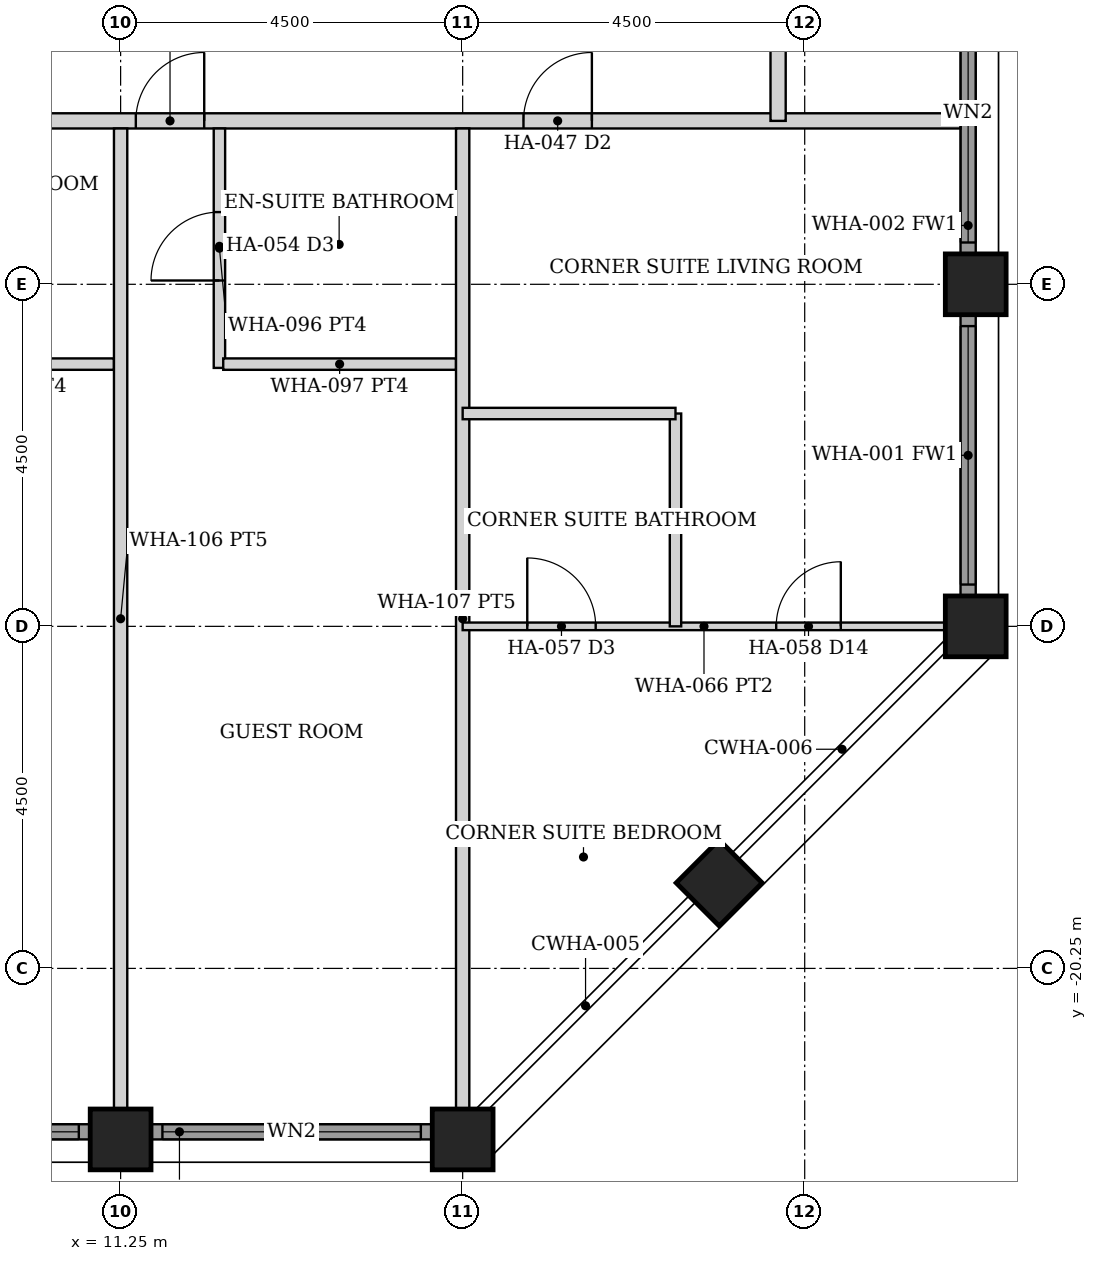
"""IFC4 building model, lengths in metres.
Left out: names, types, materials, properties, quantities, classifications, styles, units other than length and angle.
Written with IfcOpenShell. Run it as: python <this file> out.ifc"""

import sys

from ifc_helpers import new_model, si_unit, direction, frame, frame_2d, origin, origin_2d, place, context, subcontext, project, spatial, rectangle, hollow_rectangle, extrude, element, fill, save


model = new_model("IFC4")
c1 = context("Model", 3, precision=1e-05, world=origin(), true_north=direction((0.0, 1.0)))
c2 = subcontext(c1, "Body", "Model", "MODEL_VIEW")
j1 = project(units=[si_unit("LENGTHUNIT", "METRE"), si_unit("PLANEANGLEUNIT", "RADIAN")], contexts=[c1])
p1 = place(None, origin())
s1 = spatial("IfcSite", under=j1, at=p1, CompositionType="ELEMENT")
p2 = place(p1, origin())
s2 = spatial("IfcBuilding", under=s1, at=p2, CompositionType="ELEMENT")
p3 = place(p2, frame((0.0, 0.0, 118.4)))
s3 = spatial("IfcBuildingStorey", under=s2, at=p3, CompositionType="ELEMENT", Elevation=118.4)
for number, where, z_axis, x_axis in (
    (1, (22.5, -15.75, 0.0), (0.0, 0.0, 1.0), (1.0, 0.0, 0.0)),
    (2, (22.5, -11.25, 0.0), (0.0, 0.0, 1.0), (1.0, 0.0, 0.0)),
    (3, (11.25, -22.5, 0.0), (0.0, 0.0, 1.0), (0.0, 1.0, 0.0)),
    (4, (15.75, -22.5, 0.0), (0.0, 0.0, 1.0), (0.0, 1.0, 0.0)),
    (5, (19.125, -19.125, 0.0), (0.0, 0.0, 1.0), (0.707, -0.707, 0.0)),
):
    element("IfcColumn", number, at=place(p3, frame(where, z_axis=z_axis, x_axis=x_axis)), inside=s3, PredefinedType="COLUMN", context=c2, shape_type="SweptSolid", body=[
        extrude(hollow_rectangle(XDim=0.8, YDim=0.8, WallThickness=0.06, at=origin_2d()), origin(), (0.0, 0.0, 1.0), 3.6),
    ])
p4 = place(p3, frame((7.155, -22.4, 0.0), z_axis=(0.0, 0.0, 1.0), x_axis=(1.0, 0.0, 0.0)))
e6 = element("IfcWall", 6, at=p4, inside=s3, PredefinedType="SOLIDWALL", context=c2, shape_type="SweptSolid", body=[
    extrude(rectangle(XDim=3.69, YDim=0.2, at=frame_2d((1.845, 0.0))), origin(), (0.0, 0.0, 1.0), 2.479),
])
p5 = place(p4, frame((0.145, 0.0, 0.3)))
e7 = element("IfcOpeningElement", 7, at=p5, cuts=e6, PredefinedType="OPENING", context=c2, shape_type="SweptSolid", body=[
    extrude(rectangle(XDim=3.4, YDim=2.029, at=frame_2d((1.7, 1.015))), frame((0.0, 0.11, 0.0), z_axis=(0.0, -1.0, 0.0), x_axis=(1.0, 0.0, 0.0)), (0.0, 0.0, 1.0), 0.22),
])
p6 = place(p3, frame((11.655, -22.4, 0.0), z_axis=(0.0, 0.0, 1.0), x_axis=(1.0, 0.0, 0.0)))
e8 = element("IfcWall", 8, at=p6, inside=s3, PredefinedType="SOLIDWALL", context=c2, shape_type="SweptSolid", body=[
    extrude(rectangle(XDim=3.69, YDim=0.2, at=frame_2d((1.845, 0.0))), origin(), (0.0, 0.0, 1.0), 2.479),
])
p7 = place(p6, frame((0.145, 0.0, 0.3)))
e9 = element("IfcOpeningElement", 9, at=p7, cuts=e8, PredefinedType="OPENING", context=c2, shape_type="SweptSolid", body=[
    extrude(rectangle(XDim=3.4, YDim=2.029, at=frame_2d((1.7, 1.015))), frame((0.0, 0.11, 0.0), z_axis=(0.0, -1.0, 0.0), x_axis=(1.0, 0.0, 0.0)), (0.0, 0.0, 1.0), 0.22),
])
p8 = place(p3, frame((22.4, -15.345, 0.0), z_axis=(0.0, 0.0, 1.0), x_axis=(0.0, 1.0, 0.0)))
e10 = element("IfcWall", 10, at=p8, inside=s3, PredefinedType="SOLIDWALL", context=c2, shape_type="SweptSolid", body=[
    extrude(rectangle(XDim=3.69, YDim=0.2, at=frame_2d((1.845, 0.0))), origin(), (0.0, 0.0, 1.0), 2.479),
])
p9 = place(p8, frame((0.145, 0.0, 0.3)))
e11 = element("IfcOpeningElement", 11, at=p9, cuts=e10, PredefinedType="OPENING", context=c2, shape_type="SweptSolid", body=[
    extrude(rectangle(XDim=3.4, YDim=2.029, at=frame_2d((1.7, 1.015))), frame((0.0, 0.11, 0.0), z_axis=(0.0, -1.0, 0.0), x_axis=(1.0, 0.0, 0.0)), (0.0, 0.0, 1.0), 0.22),
])
p10 = place(p3, frame((22.4, -10.845, 0.0), z_axis=(0.0, 0.0, 1.0), x_axis=(0.0, 1.0, 0.0)))
e12 = element("IfcWall", 12, at=p10, inside=s3, PredefinedType="SOLIDWALL", context=c2, shape_type="SweptSolid", body=[
    extrude(rectangle(XDim=3.69, YDim=0.2, at=frame_2d((1.845, 0.0))), origin(), (0.0, 0.0, 1.0), 2.479),
])
p11 = place(p10, frame((0.145, 0.0, 0.3)))
e13 = element("IfcOpeningElement", 13, at=p11, cuts=e12, PredefinedType="OPENING", context=c2, shape_type="SweptSolid", body=[
    extrude(rectangle(XDim=3.4, YDim=2.029, at=frame_2d((1.7, 1.015))), frame((0.0, 0.11, 0.0), z_axis=(0.0, -1.0, 0.0), x_axis=(1.0, 0.0, 0.0)), (0.0, 0.0, 1.0), 0.22),
])
p12 = place(p3, frame((-22.3, -9.1, 0.0), z_axis=(0.0, 0.0, 1.0), x_axis=(1.0, 0.0, 0.0)))
e14 = element("IfcWall", 14, at=p12, inside=s3, PredefinedType="PARTITIONING", context=c2, shape_type="SweptSolid", body=[
    extrude(rectangle(XDim=44.6, YDim=0.2, at=frame_2d((22.3, 0.0))), origin(), (0.0, 0.0, 1.0), 2.473),
])
p13 = place(p12, frame((6.75, 0.0, 0.0)))
e15 = element("IfcOpeningElement", 15, at=p13, cuts=e14, PredefinedType="OPENING", context=c2, shape_type="SweptSolid", body=[
    extrude(rectangle(XDim=0.9, YDim=2.1, at=frame_2d((0.45, 1.05))), frame((0.0, 0.11, 0.0), z_axis=(0.0, -1.0, 0.0), x_axis=(1.0, 0.0, 0.0)), (0.0, 0.0, 1.0), 0.22),
])
p14 = place(p12, frame((11.25, 0.0, 0.0)))
e16 = element("IfcOpeningElement", 16, at=p14, cuts=e14, PredefinedType="OPENING", context=c2, shape_type="SweptSolid", body=[
    extrude(rectangle(XDim=0.9, YDim=2.1, at=frame_2d((0.45, 1.05))), frame((0.0, 0.11, 0.0), z_axis=(0.0, -1.0, 0.0), x_axis=(1.0, 0.0, 0.0)), (0.0, 0.0, 1.0), 0.22),
])
p15 = place(p12, frame((15.75, 0.0, 0.0)))
e17 = element("IfcOpeningElement", 17, at=p15, cuts=e14, PredefinedType="OPENING", context=c2, shape_type="SweptSolid", body=[
    extrude(rectangle(XDim=0.9, YDim=2.1, at=frame_2d((0.45, 1.05))), frame((0.0, 0.11, 0.0), z_axis=(0.0, -1.0, 0.0), x_axis=(1.0, 0.0, 0.0)), (0.0, 0.0, 1.0), 0.22),
])
p16 = place(p12, frame((20.25, 0.0, 0.0)))
e18 = element("IfcOpeningElement", 18, at=p16, cuts=e14, PredefinedType="OPENING", context=c2, shape_type="SweptSolid", body=[
    extrude(rectangle(XDim=0.9, YDim=2.1, at=frame_2d((0.45, 1.05))), frame((0.0, 0.11, 0.0), z_axis=(0.0, -1.0, 0.0), x_axis=(1.0, 0.0, 0.0)), (0.0, 0.0, 1.0), 0.22),
])
p17 = place(p12, frame((24.75, 0.0, 0.0)))
e19 = element("IfcOpeningElement", 19, at=p17, cuts=e14, PredefinedType="OPENING", context=c2, shape_type="SweptSolid", body=[
    extrude(rectangle(XDim=0.9, YDim=2.1, at=frame_2d((0.45, 1.05))), frame((0.0, 0.11, 0.0), z_axis=(0.0, -1.0, 0.0), x_axis=(1.0, 0.0, 0.0)), (0.0, 0.0, 1.0), 0.22),
])
p18 = place(p12, frame((29.25, 0.0, 0.0)))
e20 = element("IfcOpeningElement", 20, at=p18, cuts=e14, PredefinedType="OPENING", context=c2, shape_type="SweptSolid", body=[
    extrude(rectangle(XDim=0.9, YDim=2.1, at=frame_2d((0.45, 1.05))), frame((0.0, 0.11, 0.0), z_axis=(0.0, -1.0, 0.0), x_axis=(1.0, 0.0, 0.0)), (0.0, 0.0, 1.0), 0.22),
])
p19 = place(p12, frame((33.75, 0.0, 0.0)))
e21 = element("IfcOpeningElement", 21, at=p19, cuts=e14, PredefinedType="OPENING", context=c2, shape_type="SweptSolid", body=[
    extrude(rectangle(XDim=0.9, YDim=2.1, at=frame_2d((0.45, 1.05))), frame((0.0, 0.11, 0.0), z_axis=(0.0, -1.0, 0.0), x_axis=(1.0, 0.0, 0.0)), (0.0, 0.0, 1.0), 0.22),
])
p20 = place(p12, frame((38.85, 0.0, 0.0)))
e22 = element("IfcOpeningElement", 22, at=p20, cuts=e14, PredefinedType="OPENING", context=c2, shape_type="SweptSolid", body=[
    extrude(rectangle(XDim=0.9, YDim=2.1, at=frame_2d((0.45, 1.05))), frame((0.0, 0.11, 0.0), z_axis=(0.0, -1.0, 0.0), x_axis=(1.0, 0.0, 0.0)), (0.0, 0.0, 1.0), 0.22),
])
p21 = place(p12, frame((4.85, 0.0, 0.0)))
e23 = element("IfcOpeningElement", 23, at=p21, cuts=e14, PredefinedType="OPENING", context=c2, shape_type="SweptSolid", body=[
    extrude(rectangle(XDim=0.9, YDim=2.1, at=frame_2d((0.45, 1.05))), frame((0.0, 0.11, 0.0), z_axis=(0.0, -1.0, 0.0), x_axis=(1.0, 0.0, 0.0)), (0.0, 0.0, 1.0), 0.22),
])
p22 = place(p3, frame((19.9, -9.1, 0.0), z_axis=(0.0, 0.0, 1.0), x_axis=(0.0, 1.0, 0.0)))
e24 = element("IfcWall", 24, at=p22, inside=s3, PredefinedType="PARTITIONING", context=c2, shape_type="SweptSolid", body=[
    extrude(rectangle(XDim=6.9, YDim=0.2, at=frame_2d((3.45, 0.0))), origin(), (0.0, 0.0, 1.0), 2.473),
])
p23 = place(p22, frame((3.075, 0.0, 0.0)))
e25 = element("IfcOpeningElement", 25, at=p23, cuts=e24, PredefinedType="OPENING", context=c2, shape_type="SweptSolid", body=[
    extrude(rectangle(XDim=0.8, YDim=2.1, at=frame_2d((0.4, 1.05))), frame((0.0, 0.11, 0.0), z_axis=(0.0, -1.0, 0.0), x_axis=(1.0, 0.0, 0.0)), (0.0, 0.0, 1.0), 0.22),
])
p24 = place(p3, frame((8.1, -12.3, 0.0), z_axis=(0.0, 0.0, 1.0), x_axis=(1.0, 0.0, 0.0)))
e26 = element("IfcWall", 26, at=p24, inside=s3, PredefinedType="PARTITIONING", context=c2, shape_type="SweptSolid", body=[
    extrude(rectangle(XDim=3.062, YDim=0.15, at=frame_2d((1.531, 0.0))), origin(), (0.0, 0.0, 1.0), 2.473),
])
p25 = place(p3, frame((12.55, -12.35, 0.0), z_axis=(0.0, 0.0, 1.0), x_axis=(0.0, 1.0, 0.0)))
e27 = element("IfcWall", 27, at=p25, inside=s3, PredefinedType="PARTITIONING", context=c2, shape_type="SweptSolid", body=[
    extrude(rectangle(XDim=3.15, YDim=0.15, at=frame_2d((1.575, 0.0))), origin(), (0.0, 0.0, 1.0), 2.473),
])
p26 = place(p25, frame((1.15, 0.0, 0.0)))
e28 = element("IfcOpeningElement", 28, at=p26, cuts=e27, PredefinedType="OPENING", context=c2, shape_type="SweptSolid", body=[
    extrude(rectangle(XDim=0.9, YDim=2.1, at=frame_2d((0.45, 1.05))), frame((0.0, 0.085, 0.0), z_axis=(0.0, -1.0, 0.0), x_axis=(1.0, 0.0, 0.0)), (0.0, 0.0, 1.0), 0.17),
])
p27 = place(p3, frame((12.6, -12.3, 0.0), z_axis=(0.0, 0.0, 1.0), x_axis=(1.0, 0.0, 0.0)))
e29 = element("IfcWall", 29, at=p27, inside=s3, PredefinedType="PARTITIONING", context=c2, shape_type="SweptSolid", body=[
    extrude(rectangle(XDim=3.062, YDim=0.15, at=frame_2d((1.531, 0.0))), origin(), (0.0, 0.0, 1.0), 2.473),
])
for number, where, z_axis, x_axis in (
    (30, (11.25, -22.1, 0.0), (0.0, 0.0, 1.0), (0.0, 1.0, 0.0)),
    (31, (15.75, -22.1, 0.0), (0.0, 0.0, 1.0), (0.0, 1.0, 0.0)),
):
    element("IfcWall", number, at=place(p3, frame(where, z_axis=z_axis, x_axis=x_axis)), inside=s3, PredefinedType="PARTITIONING", context=c2, shape_type="SweptSolid", body=[
        extrude(rectangle(XDim=12.9, YDim=0.175, at=frame_2d((6.45, 0.0))), origin(), (0.0, 0.0, 1.0), 2.473),
    ])
p28 = place(p3, frame((15.75, -15.75, 0.0), z_axis=(0.0, 0.0, 1.0), x_axis=(1.0, 0.0, 0.0)))
e32 = element("IfcWall", 32, at=p28, inside=s3, PredefinedType="PARTITIONING", context=c2, shape_type="SweptSolid", body=[
    extrude(rectangle(XDim=6.35, YDim=0.1, at=frame_2d((3.175, 0.0))), origin(), (0.0, 0.0, 1.0), 2.473),
])
p29 = place(p28, frame((4.125, 0.0, 0.0)))
e33 = element("IfcOpeningElement", 33, at=p29, cuts=e32, PredefinedType="OPENING", context=c2, shape_type="SweptSolid", body=[
    extrude(rectangle(XDim=0.85, YDim=2.1, at=frame_2d((0.425, 1.05))), frame((0.0, 0.06, 0.0), z_axis=(0.0, -1.0, 0.0), x_axis=(1.0, 0.0, 0.0)), (0.0, 0.0, 1.0), 0.12),
])
p30 = place(p28, frame((0.85, 0.0, 0.0)))
e34 = element("IfcOpeningElement", 34, at=p30, cuts=e32, PredefinedType="OPENING", context=c2, shape_type="SweptSolid", body=[
    extrude(rectangle(XDim=0.9, YDim=2.1, at=frame_2d((0.45, 1.05))), frame((0.0, 0.06, 0.0), z_axis=(0.0, -1.0, 0.0), x_axis=(1.0, 0.0, 0.0)), (0.0, 0.0, 1.0), 0.12),
])
for number, where, z_axis, x_axis in (
    (35, (18.55, -15.75, 0.0), (0.0, 0.0, 1.0), (0.0, 1.0, 0.0)),
    (36, (15.75, -12.95, 0.0), (0.0, 0.0, 1.0), (1.0, 0.0, 0.0)),
):
    element("IfcWall", number, at=place(p3, frame(where, z_axis=z_axis, x_axis=x_axis)), inside=s3, PredefinedType="PARTITIONING", context=c2, shape_type="SweptSolid", body=[
        extrude(rectangle(XDim=2.8, YDim=0.15, at=frame_2d((1.4, 0.0))), origin(), (0.0, 0.0, 1.0), 2.473),
    ])
p31 = place(p5, origin())
e37 = element("IfcWindow", 37, at=p31, inside=s3, PartitioningType="SINGLE_PANEL", PredefinedType="WINDOW", context=c2, shape_type="SweptSolid", body=[
    extrude(rectangle(XDim=3.4, YDim=2.029, at=frame_2d((1.7, 1.015))), frame((0.0, 0.03, 0.0), z_axis=(0.0, -1.0, 0.0), x_axis=(1.0, 0.0, 0.0)), (0.0, 0.0, 1.0), 0.06),
])
fill(e7, e37)
p32 = place(p7, origin())
e38 = element("IfcWindow", 38, at=p32, inside=s3, PartitioningType="SINGLE_PANEL", PredefinedType="WINDOW", context=c2, shape_type="SweptSolid", body=[
    extrude(rectangle(XDim=3.4, YDim=2.029, at=frame_2d((1.7, 1.015))), frame((0.0, 0.03, 0.0), z_axis=(0.0, -1.0, 0.0), x_axis=(1.0, 0.0, 0.0)), (0.0, 0.0, 1.0), 0.06),
])
fill(e9, e38)
p33 = place(p9, origin())
e39 = element("IfcWindow", 39, at=p33, inside=s3, PartitioningType="SINGLE_PANEL", PredefinedType="WINDOW", context=c2, shape_type="SweptSolid", body=[
    extrude(rectangle(XDim=3.4, YDim=2.029, at=frame_2d((1.7, 1.015))), frame((0.0, 0.03, 0.0), z_axis=(0.0, -1.0, 0.0), x_axis=(1.0, 0.0, 0.0)), (0.0, 0.0, 1.0), 0.06),
])
fill(e11, e39)
p34 = place(p11, origin())
e40 = element("IfcWindow", 40, at=p34, inside=s3, PartitioningType="SINGLE_PANEL", PredefinedType="WINDOW", context=c2, shape_type="SweptSolid", body=[
    extrude(rectangle(XDim=3.4, YDim=2.029, at=frame_2d((1.7, 1.015))), frame((0.0, 0.03, 0.0), z_axis=(0.0, -1.0, 0.0), x_axis=(1.0, 0.0, 0.0)), (0.0, 0.0, 1.0), 0.06),
])
fill(e13, e40)
p35 = place(p19, origin())
e41 = element("IfcDoor", 41, at=p35, inside=s3, OperationType="SINGLE_SWING_RIGHT", PredefinedType="DOOR", context=c2, shape_type="SweptSolid", body=[
    extrude(rectangle(XDim=0.9, YDim=2.1, at=frame_2d((0.45, 1.05))), frame((0.0, 0.025, 0.0), z_axis=(0.0, -1.0, 0.0), x_axis=(1.0, 0.0, 0.0)), (0.0, 0.0, 1.0), 0.05),
])
fill(e21, e41)
p36 = place(p26, origin())
e42 = element("IfcDoor", 42, at=p36, inside=s3, OperationType="SINGLE_SWING_LEFT", PredefinedType="DOOR", context=c2, shape_type="SweptSolid", body=[
    extrude(rectangle(XDim=0.9, YDim=2.1, at=frame_2d((0.45, 1.05))), frame((0.0, 0.025, 0.0), z_axis=(0.0, -1.0, 0.0), x_axis=(1.0, 0.0, 0.0)), (0.0, 0.0, 1.0), 0.05),
])
fill(e28, e42)
p37 = place(p20, origin())
e43 = element("IfcDoor", 43, at=p37, inside=s3, OperationType="SINGLE_SWING_RIGHT", PredefinedType="DOOR", context=c2, shape_type="SweptSolid", body=[
    extrude(rectangle(XDim=0.9, YDim=2.1, at=frame_2d((0.45, 1.05))), frame((0.0, 0.025, 0.0), z_axis=(0.0, -1.0, 0.0), x_axis=(1.0, 0.0, 0.0)), (0.0, 0.0, 1.0), 0.05),
])
fill(e22, e43)
p38 = place(p29, origin())
e44 = element("IfcDoor", 44, at=p38, inside=s3, OperationType="SINGLE_SWING_RIGHT", PredefinedType="DOOR", context=c2, shape_type="SweptSolid", body=[
    extrude(rectangle(XDim=0.85, YDim=2.1, at=frame_2d((0.425, 1.05))), frame((0.0, 0.025, 0.0), z_axis=(0.0, -1.0, 0.0), x_axis=(1.0, 0.0, 0.0)), (0.0, 0.0, 1.0), 0.05),
])
fill(e33, e44)
p39 = place(p30, origin())
e45 = element("IfcDoor", 45, at=p39, inside=s3, OperationType="SINGLE_SWING_LEFT", PredefinedType="DOOR", context=c2, shape_type="SweptSolid", body=[
    extrude(rectangle(XDim=0.9, YDim=2.1, at=frame_2d((0.45, 1.05))), frame((0.0, 0.025, 0.0), z_axis=(0.0, -1.0, 0.0), x_axis=(1.0, 0.0, 0.0)), (0.0, 0.0, 1.0), 0.05),
])
fill(e34, e45)
save(model, sys.argv[1])
